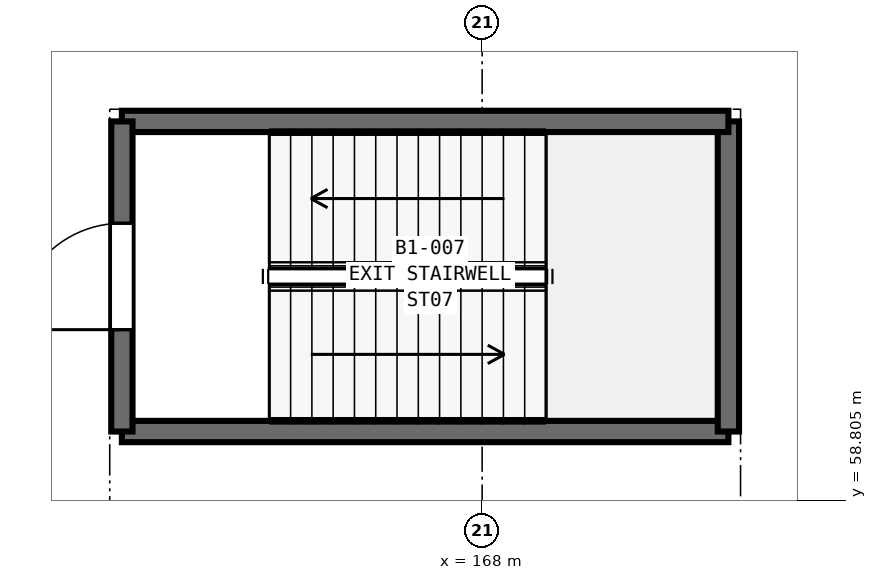
"""IFC4 building model, lengths in metres.
Left out: names, types, materials, properties, quantities, classifications, styles, units other than length and angle.
Written with IfcOpenShell. Run it as: python <this file> out.ifc"""

import sys

from ifc_helpers import new_model, si_unit, direction, frame, frame_2d, origin, place, context, subcontext, project, spatial, rectangle, extrude, element, fill, save


model = new_model("IFC4")
c1 = context("Model", 3, precision=1e-05, world=origin(), true_north=direction((0.0, 1.0)))
c2 = subcontext(c1, "Body", "Model", "MODEL_VIEW")
j1 = project(units=[si_unit("LENGTHUNIT", "METRE"), si_unit("PLANEANGLEUNIT", "RADIAN")], contexts=[c1])
p1 = place(None, origin())
s1 = spatial("IfcSite", under=j1, at=p1, CompositionType="ELEMENT")
p2 = place(p1, origin())
s2 = spatial("IfcBuilding", under=s1, at=p2, CompositionType="ELEMENT")
p3 = place(p2, frame((0.0, 0.0, -4.8)))
s3 = spatial("IfcBuildingStorey", under=s2, at=p3, CompositionType="ELEMENT", Elevation=-4.8)
p4 = place(p3, frame((163.26, 59.71, 0.0), z_axis=(0.0, 0.0, 1.0), x_axis=(1.0, 0.0, 0.0)))
e1 = element("IfcWall", 1, at=p4, inside=s3, PredefinedType="SHEAR", context=c2, shape_type="SweptSolid", body=[
    extrude(rectangle(XDim=7.98, YDim=0.28, at=frame_2d((3.99, 0.0))), origin(), (0.0, 0.0, 1.0), 4.8),
])
p5 = place(p3, frame((171.24, 59.71, 0.0), z_axis=(0.0, 0.0, 1.0), x_axis=(0.0, 1.0, 0.0)))
e2 = element("IfcWall", 2, at=p5, inside=s3, PredefinedType="SHEAR", context=c2, shape_type="SweptSolid", body=[
    extrude(rectangle(XDim=4.08, YDim=0.28, at=frame_2d((2.04, 0.0))), origin(), (0.0, 0.0, 1.0), 4.8),
])
p6 = place(p3, frame((171.24, 63.79, 0.0), z_axis=(0.0, 0.0, 1.0), x_axis=(-1.0, 0.0, 0.0)))
e3 = element("IfcWall", 3, at=p6, inside=s3, PredefinedType="SHEAR", context=c2, shape_type="SweptSolid", body=[
    extrude(rectangle(XDim=7.98, YDim=0.28, at=frame_2d((3.99, 0.0))), origin(), (0.0, 0.0, 1.0), 4.8),
])
p7 = place(p3, frame((163.26, 63.79, 0.0), z_axis=(0.0, 0.0, 1.0), x_axis=(0.0, -1.0, 0.0)))
e4 = element("IfcWall", 4, at=p7, inside=s3, PredefinedType="SHEAR", context=c2, shape_type="SweptSolid", body=[
    extrude(rectangle(XDim=4.08, YDim=0.28, at=frame_2d((2.04, 0.0))), origin(), (0.0, 0.0, 1.0), 4.8),
])
p8 = place(p7, frame((1.34, 0.0, 0.0)))
e5 = element("IfcOpeningElement", 5, at=p8, cuts=e4, PredefinedType="OPENING", context=c2, shape_type="SweptSolid", body=[
    extrude(rectangle(XDim=1.4, YDim=2.2, at=frame_2d((0.7, 1.1))), frame((0.0, 0.15, 0.0), z_axis=(0.0, -1.0, 0.0), x_axis=(1.0, 0.0, 0.0)), (0.0, 0.0, 1.0), 0.3),
])
p9 = place(p8, frame((1.4, 0.0, 0.0), z_axis=(0.0, 0.0, 1.0), x_axis=(-1.0, 0.0, 0.0)))
e6 = element("IfcDoor", 6, at=p9, inside=s3, OperationType="SINGLE_SWING_LEFT", PredefinedType="DOOR", context=c2, shape_type="SweptSolid", body=[
    extrude(rectangle(XDim=1.4, YDim=2.2, at=frame_2d((0.7, 1.1))), frame((0.0, 0.025, 0.0), z_axis=(0.0, -1.0, 0.0), x_axis=(1.0, 0.0, 0.0)), (0.0, 0.0, 1.0), 0.05),
])
fill(e5, e6)
save(model, sys.argv[1])
